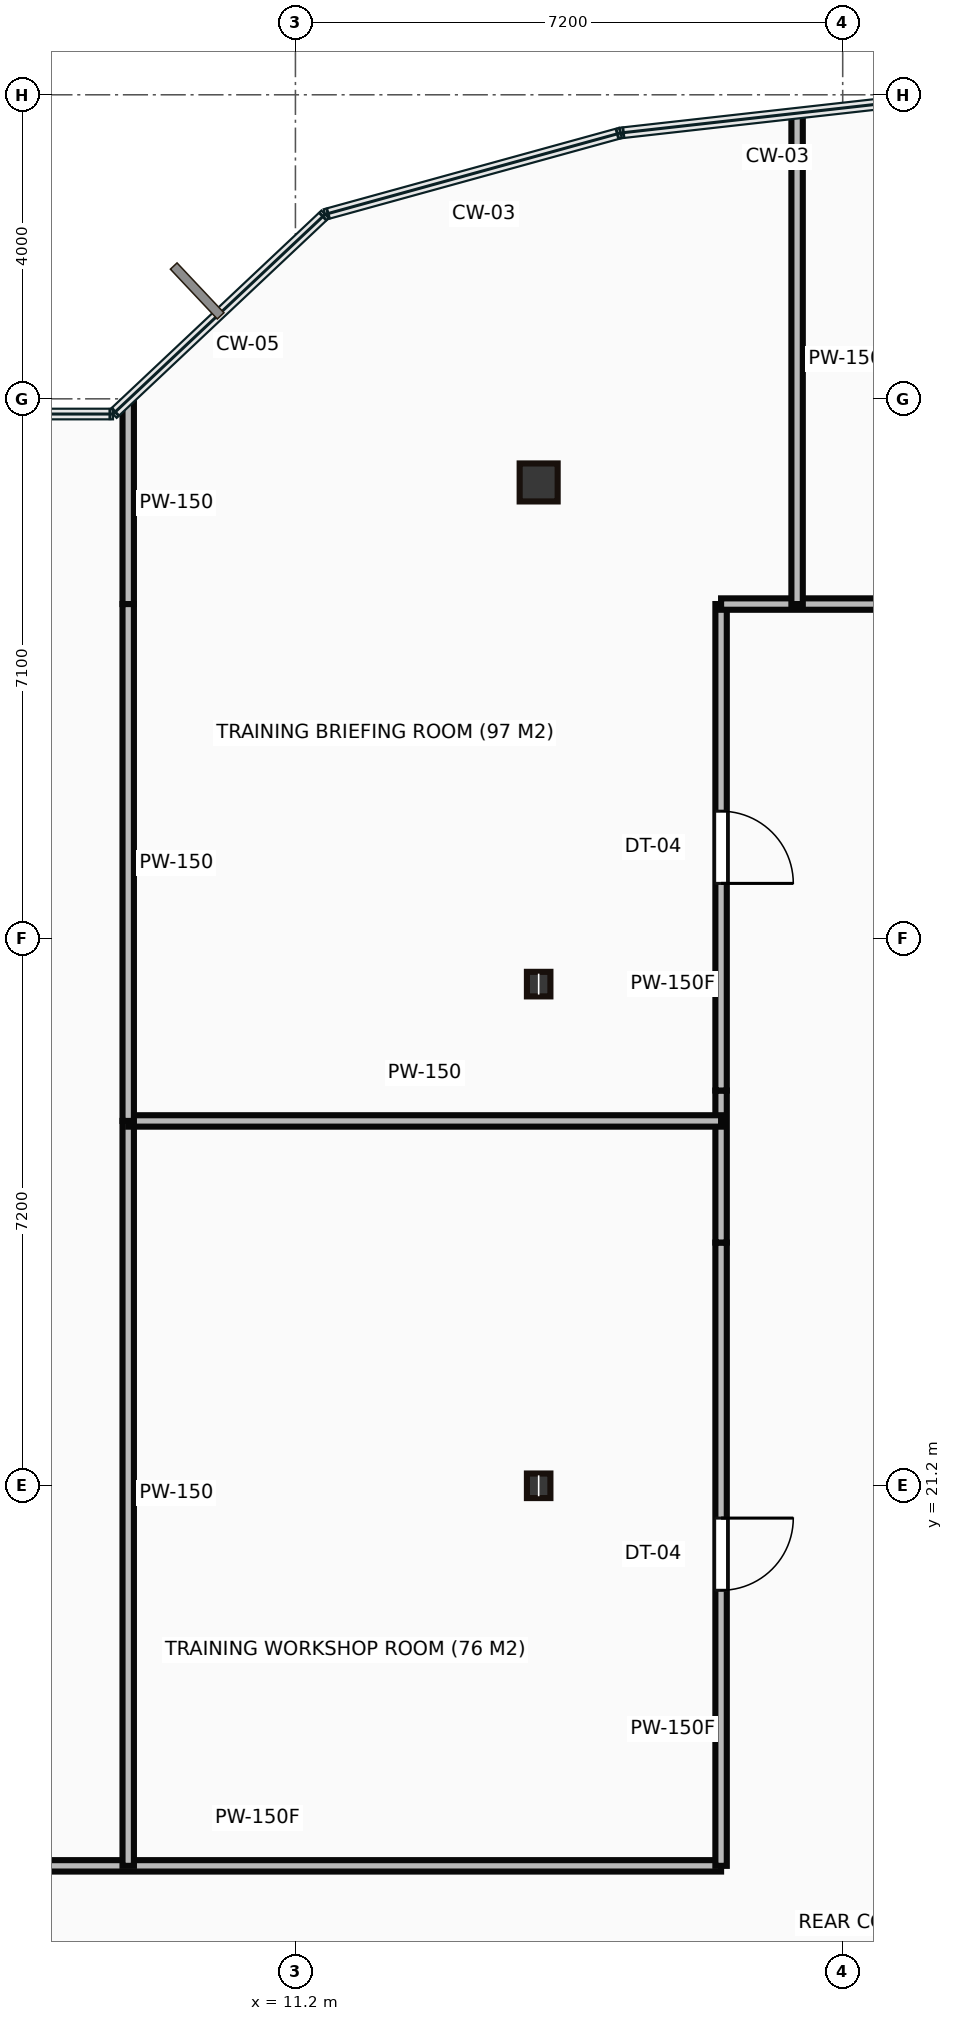
"""IFC4 building model, lengths in metres.
Left out: names, types, materials, properties, quantities, classifications, styles, units other than length and angle.
Written with IfcOpenShell. Run it as: python <this file> out.ifc"""

import sys

from ifc_helpers import new_model, si_unit, direction, frame, frame_2d, origin, origin_2d, place, context, subcontext, project, spatial, rectangle, hollow_rectangle, i_section, extrude, source, transform, mapped, element, fill, save


model = new_model("IFC4")
c1 = context("Model", 3, precision=1e-05, world=origin(), true_north=direction((0.0, 1.0)))
c2 = subcontext(c1, "Body", "Model", "MODEL_VIEW")
j1 = project(units=[si_unit("LENGTHUNIT", "METRE"), si_unit("PLANEANGLEUNIT", "RADIAN")], contexts=[c1])
p1 = place(None, origin())
s1 = spatial("IfcSite", under=j1, at=p1, CompositionType="ELEMENT")
p2 = place(p1, origin())
s2 = spatial("IfcBuilding", under=s1, at=p2, CompositionType="ELEMENT")
p3 = place(p2, frame((0.0, 0.0, 258.8)))
s3 = spatial("IfcBuildingStorey", under=s2, at=p3, CompositionType="ELEMENT", Elevation=258.8)
m1 = source(origin(), c2, "Body", "SweptSolid", [
    extrude(i_section(OverallWidth=0.309, OverallDepth=0.323, WebThickness=0.014, FlangeThickness=0.023, at=origin_2d()), origin(), (0.0, 0.0, 1.0), 3.65),
])
for number, where, z_axis, x_axis in (
    (1, (14.4, 21.2, 0.0), (0.0, 0.0, 1.0), (1.0, 0.0, 0.0)),
    (2, (14.4, 27.8, 0.0), (0.0, 0.0, 1.0), (1.0, 0.0, 0.0)),
):
    element("IfcColumn", number, at=place(p3, frame(where, z_axis=z_axis, x_axis=x_axis)), inside=s3, PredefinedType="COLUMN", context=c2, shape_type="MappedRepresentation", body=[
        mapped(m1, transform((0.0, 0.0, 0.0))),
    ])
m2 = source(origin(), c2, "Body", "SweptSolid", [
    extrude(hollow_rectangle(XDim=0.5, YDim=0.5, WallThickness=0.022, at=origin_2d()), origin(), (0.0, 0.0, 1.0), 3.65),
])
p4 = place(p3, frame((14.4, 34.4, 0.0), z_axis=(0.0, 0.0, 1.0), x_axis=(1.0, 0.0, 0.0)))
e3 = element("IfcColumn", 3, at=p4, inside=s3, PredefinedType="COLUMN", context=c2, shape_type="MappedRepresentation", body=[
    mapped(m2, transform((0.0, 0.0, 0.0))),
])
m3 = source(origin(), c2, "Body", "SweptSolid", [
    extrude(rectangle(XDim=12.2, YDim=0.15, at=frame_2d((6.1, 0.0))), origin(), (0.0, 0.0, 1.0), 3.4),
])
p5 = place(p3, frame((4.6, 16.2, 0.0), z_axis=(0.0, 0.0, 1.0), x_axis=(1.0, 0.0, 0.0)))
e4 = element("IfcWall", 4, at=p5, inside=s3, PredefinedType="PARTITIONING", context=c2, shape_type="MappedRepresentation", body=[
    mapped(m3, transform((0.0, 0.0, 0.0))),
])
p6 = place(p5, frame((1.855, 0.0, 0.0)))
e5 = element("IfcOpeningElement", 5, at=p6, cuts=e4, PredefinedType="OPENING", context=c2, shape_type="SweptSolid", body=[
    extrude(rectangle(XDim=0.95, YDim=2.15, at=frame_2d((0.475, 1.075))), frame((0.0, 0.085, 0.0), z_axis=(0.0, -1.0, 0.0), x_axis=(1.0, 0.0, 0.0)), (0.0, 0.0, 1.0), 0.17),
])
m4 = source(origin(), c2, "Body", "SweptSolid", [
    extrude(rectangle(XDim=8.2, YDim=0.15, at=frame_2d((4.1, 0.0))), origin(), (0.0, 0.0, 1.0), 3.4),
])
p7 = place(p3, frame((16.8, 16.2, 0.0), z_axis=(0.0, 0.0, 1.0), x_axis=(0.0, 1.0, 0.0)))
e6 = element("IfcWall", 6, at=p7, inside=s3, PredefinedType="PARTITIONING", context=c2, shape_type="MappedRepresentation", body=[
    mapped(m4, transform((0.0, 0.0, 0.0))),
])
p8 = place(p7, frame((3.625, 0.0, 0.0)))
e7 = element("IfcOpeningElement", 7, at=p8, cuts=e6, PredefinedType="OPENING", context=c2, shape_type="SweptSolid", body=[
    extrude(rectangle(XDim=0.95, YDim=2.15, at=frame_2d((0.475, 1.075))), frame((0.0, 0.085, 0.0), z_axis=(0.0, -1.0, 0.0), x_axis=(1.0, 0.0, 0.0)), (0.0, 0.0, 1.0), 0.17),
])
m5 = source(origin(), c2, "Body", "SweptSolid", [
    extrude(rectangle(XDim=2.0, YDim=0.15, at=frame_2d((1.0, 0.0))), origin(), (0.0, 0.0, 1.0), 3.4),
])
p9 = place(p3, frame((16.8, 24.4, 0.0), z_axis=(0.0, 0.0, 1.0), x_axis=(0.0, 1.0, 0.0)))
e8 = element("IfcWall", 8, at=p9, inside=s3, PredefinedType="PARTITIONING", context=c2, shape_type="MappedRepresentation", body=[
    mapped(m5, transform((0.0, 0.0, 0.0))),
])
m6 = source(origin(), c2, "Body", "SweptSolid", [
    extrude(rectangle(XDim=6.4, YDim=0.15, at=frame_2d((3.2, 0.0))), origin(), (0.0, 0.0, 1.0), 3.4),
])
p10 = place(p3, frame((16.8, 26.4, 0.0), z_axis=(0.0, 0.0, 1.0), x_axis=(0.0, 1.0, 0.0)))
e9 = element("IfcWall", 9, at=p10, inside=s3, PredefinedType="PARTITIONING", context=c2, shape_type="MappedRepresentation", body=[
    mapped(m6, transform((0.0, 0.0, 0.0))),
])
p11 = place(p10, frame((2.725, 0.0, 0.0)))
e10 = element("IfcOpeningElement", 10, at=p11, cuts=e9, PredefinedType="OPENING", context=c2, shape_type="SweptSolid", body=[
    extrude(rectangle(XDim=0.95, YDim=2.15, at=frame_2d((0.475, 1.075))), frame((0.0, 0.085, 0.0), z_axis=(0.0, -1.0, 0.0), x_axis=(1.0, 0.0, 0.0)), (0.0, 0.0, 1.0), 0.17),
])
m7 = source(origin(), c2, "Body", "SweptSolid", [
    extrude(rectangle(XDim=2.15, YDim=0.15, at=frame_2d((1.075, 0.0))), origin(), (0.0, 0.0, 1.0), 3.4),
])
p12 = place(p3, frame((16.8, 32.8, 0.0), z_axis=(0.0, 0.0, 1.0), x_axis=(1.0, 0.0, 0.0)))
e11 = element("IfcWall", 11, at=p12, inside=s3, PredefinedType="PARTITIONING", context=c2, shape_type="MappedRepresentation", body=[
    mapped(m7, transform((0.0, 0.0, 0.0))),
])
m8 = source(origin(), c2, "Body", "SweptSolid", [
    extrude(rectangle(XDim=9.8, YDim=0.15, at=frame_2d((4.9, 0.0))), origin(), (0.0, 0.0, 1.0), 3.4),
])
p13 = place(p3, frame((9.0, 26.0, 0.0), z_axis=(0.0, 0.0, 1.0), x_axis=(0.0, -1.0, 0.0)))
e12 = element("IfcWall", 12, at=p13, inside=s3, PredefinedType="PARTITIONING", context=c2, shape_type="MappedRepresentation", body=[
    mapped(m8, transform((0.0, 0.0, 0.0))),
])
m9 = source(origin(), c2, "Body", "SweptSolid", [
    extrude(rectangle(XDim=7.8, YDim=0.15, at=frame_2d((3.9, 0.0))), origin(), (0.0, 0.0, 1.0), 3.4),
])
p14 = place(p3, frame((9.0, 26.0, 0.0), z_axis=(0.0, 0.0, 1.0), x_axis=(1.0, 0.0, 0.0)))
e13 = element("IfcWall", 13, at=p14, inside=s3, PredefinedType="PARTITIONING", context=c2, shape_type="MappedRepresentation", body=[
    mapped(m9, transform((0.0, 0.0, 0.0))),
])
m10 = source(origin(), c2, "Body", "SweptSolid", [
    extrude(rectangle(XDim=2.661, YDim=0.15, at=frame_2d((1.33, 0.0))), origin(), (0.0, 0.0, 1.0), 3.4),
])
p15 = place(p3, frame((9.0, 35.461, 0.0), z_axis=(0.0, 0.0, 1.0), x_axis=(0.0, -1.0, 0.0)))
e14 = element("IfcWall", 14, at=p15, inside=s3, PredefinedType="PARTITIONING", context=c2, shape_type="MappedRepresentation", body=[
    mapped(m10, transform((0.0, 0.0, 0.0))),
])
m11 = source(origin(), c2, "Body", "SweptSolid", [
    extrude(rectangle(XDim=6.8, YDim=0.15, at=frame_2d((3.4, 0.0))), origin(), (0.0, 0.0, 1.0), 3.4),
])
p16 = place(p3, frame((9.0, 32.8, 0.0), z_axis=(0.0, 0.0, 1.0), x_axis=(0.0, -1.0, 0.0)))
e15 = element("IfcWall", 15, at=p16, inside=s3, PredefinedType="PARTITIONING", context=c2, shape_type="MappedRepresentation", body=[
    mapped(m11, transform((0.0, 0.0, 0.0))),
])
m12 = source(origin(), c2, "Body", "SweptSolid", [
    extrude(rectangle(XDim=6.438, YDim=0.15, at=frame_2d((3.219, 0.0))), origin(), (0.0, 0.0, 1.0), 3.4),
])
p17 = place(p3, frame((17.8, 39.238, 0.0), z_axis=(0.0, 0.0, 1.0), x_axis=(0.0, -1.0, 0.0)))
e16 = element("IfcWall", 16, at=p17, inside=s3, PredefinedType="PARTITIONING", context=c2, shape_type="MappedRepresentation", body=[
    mapped(m12, transform((0.0, 0.0, 0.0))),
])
m13 = source(origin(), c2, "Body", "SweptSolid", [
    extrude(rectangle(XDim=0.95, YDim=2.15, at=frame_2d((0.475, 1.075))), frame((0.0, 0.025, 0.0), z_axis=(0.0, -1.0, 0.0), x_axis=(1.0, 0.0, 0.0)), (0.0, 0.0, 1.0), 0.05),
])
p18 = place(p8, origin())
e17 = element("IfcDoor", 17, at=p18, inside=s3, OperationType="SINGLE_SWING_RIGHT", PredefinedType="DOOR", context=c2, shape_type="MappedRepresentation", body=[
    mapped(m13, transform((0.0, 0.0, 0.0))),
])
fill(e7, e17)
p19 = place(p11, origin())
e18 = element("IfcDoor", 18, at=p19, inside=s3, OperationType="SINGLE_SWING_LEFT", PredefinedType="DOOR", context=c2, shape_type="MappedRepresentation", body=[
    mapped(m13, transform((0.0, 0.0, 0.0))),
])
fill(e10, e18)
save(model, sys.argv[1])
